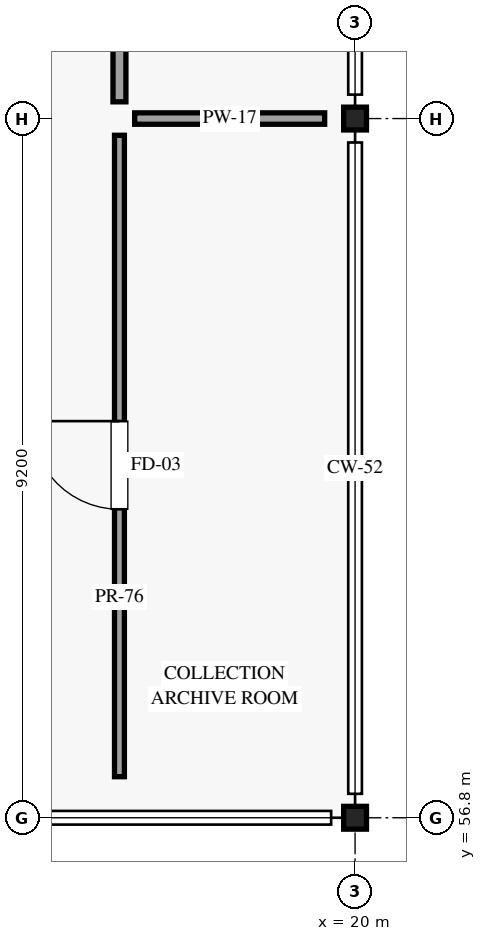
"""IFC4 building model, lengths in metres.
Left out: names, types, materials, properties, quantities, classifications, styles, units other than length and angle.
Written with IfcOpenShell. Run it as: python <this file> out.ifc"""

import sys

from ifc_helpers import new_model, si_unit, direction, frame, frame_2d, origin, origin_2d, place, context, subcontext, project, spatial, rectangle, i_section, extrude, element, fill, save


model = new_model("IFC4")
c1 = context("Model", 3, precision=1e-05, world=origin(), true_north=direction((0.0, 1.0)))
c2 = subcontext(c1, "Body", "Model", "MODEL_VIEW")
j1 = project(units=[si_unit("LENGTHUNIT", "METRE"), si_unit("PLANEANGLEUNIT", "RADIAN")], contexts=[c1])
p1 = place(None, origin())
s1 = spatial("IfcSite", under=j1, at=p1, CompositionType="ELEMENT")
p2 = place(p1, origin())
s2 = spatial("IfcBuilding", under=s1, at=p2, CompositionType="ELEMENT")
p3 = place(p2, frame((0.0, 0.0, 5.4)))
s3 = spatial("IfcBuildingStorey", under=s2, at=p3, CompositionType="ELEMENT", Elevation=5.4)
for number, where, z_axis, x_axis in (
    (1, (20.0, 56.8, 0.0), (0.0, 0.0, 1.0), (1.0, 0.0, 0.0)),
    (2, (20.0, 66.0, 0.0), (0.0, 0.0, 1.0), (1.0, 0.0, 0.0)),
):
    element("IfcColumn", number, at=place(p3, frame(where, z_axis=z_axis, x_axis=x_axis)), inside=s3, PredefinedType="COLUMN", context=c2, shape_type="SweptSolid", body=[
        extrude(i_section(OverallWidth=0.3, OverallDepth=0.3, WebThickness=0.011, FlangeThickness=0.019, FilletRadius=0.027, at=origin_2d()), origin(), (0.0, 0.0, 1.0), 4.8),
    ])
p4 = place(p3, frame((16.9, 57.34, 0.0), z_axis=(0.0, 0.0, 1.0), x_axis=(0.0, 1.0, 0.0)))
e3 = element("IfcWall", 3, at=p4, inside=s3, PredefinedType="PARTITIONING", context=c2, shape_type="SweptSolid", body=[
    extrude(rectangle(XDim=8.44, YDim=0.13, at=frame_2d((4.22, 0.0))), origin(), (0.0, 0.0, 1.0), 4.095),
])
p5 = place(p4, frame((3.519, 0.0, 0.0)))
e4 = element("IfcOpeningElement", 4, at=p5, cuts=e3, PredefinedType="OPENING", context=c2, shape_type="SweptSolid", body=[
    extrude(rectangle(XDim=1.16, YDim=2.28, at=frame_2d((0.58, 1.14))), frame((0.0, 0.075, 0.0), z_axis=(0.0, -1.0, 0.0), x_axis=(1.0, 0.0, 0.0)), (0.0, 0.0, 1.0), 0.15),
])
p6 = place(p3, frame((17.1, 66.0, 0.0), z_axis=(0.0, 0.0, 1.0), x_axis=(1.0, 0.0, 0.0)))
e5 = element("IfcWall", 5, at=p6, inside=s3, PredefinedType="PARTITIONING", context=c2, shape_type="SweptSolid", body=[
    extrude(rectangle(XDim=2.5, YDim=0.15, at=frame_2d((1.25, 0.0))), origin(), (0.0, 0.0, 1.0), 4.095),
])
p7 = place(p3, frame((16.9, 66.22, 0.0), z_axis=(0.0, 0.0, 1.0), x_axis=(0.0, 1.0, 0.0)))
e6 = element("IfcWall", 6, at=p7, inside=s3, PredefinedType="PARTITIONING", context=c2, shape_type="SweptSolid", body=[
    extrude(rectangle(XDim=17.96, YDim=0.17, at=frame_2d((8.98, 0.0))), origin(), (0.0, 0.0, 1.0), 4.095),
])
p8 = place(p7, frame((3.713, 0.0, 0.0)))
e7 = element("IfcOpeningElement", 7, at=p8, cuts=e6, PredefinedType="OPENING", context=c2, shape_type="SweptSolid", body=[
    extrude(rectangle(XDim=1.82, YDim=2.46, at=frame_2d((0.91, 1.23))), frame((0.0, 0.095, 0.0), z_axis=(0.0, -1.0, 0.0), x_axis=(1.0, 0.0, 0.0)), (0.0, 0.0, 1.0), 0.19),
])
p9 = place(p5, origin())
e8 = element("IfcDoor", 8, at=p9, inside=s3, OperationType="SINGLE_SWING_RIGHT", PredefinedType="DOOR", context=c2, shape_type="SweptSolid", body=[
    extrude(rectangle(XDim=1.16, YDim=2.28, at=frame_2d((0.58, 1.14))), frame((0.0, 0.025, 0.0), z_axis=(0.0, -1.0, 0.0), x_axis=(1.0, 0.0, 0.0)), (0.0, 0.0, 1.0), 0.05),
])
fill(e4, e8)
save(model, sys.argv[1])
